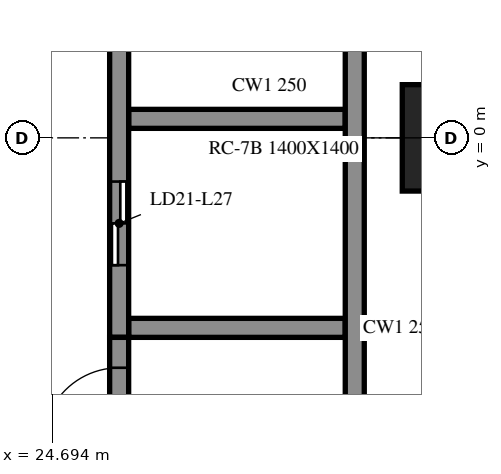
"""IFC4 building model, lengths in metres.
Left out: names, types, materials, properties, quantities, classifications, styles, units other than length and angle.
Written with IfcOpenShell. Run it as: python <this file> out.ifc"""

import sys

from ifc_helpers import new_model, si_unit, direction, frame, frame_2d, origin, origin_2d, place, context, subcontext, project, spatial, rectangle, extrude, element, fill, save


model = new_model("IFC4")
c1 = context("Model", 3, precision=1e-05, world=origin(), true_north=direction((0.0, 1.0)))
c2 = subcontext(c1, "Body", "Model", "MODEL_VIEW")
j1 = project(units=[si_unit("LENGTHUNIT", "METRE"), si_unit("PLANEANGLEUNIT", "RADIAN")], contexts=[c1])
p1 = place(None, origin())
s1 = spatial("IfcSite", under=j1, at=p1, CompositionType="ELEMENT")
p2 = place(p1, origin())
s2 = spatial("IfcBuilding", under=s1, at=p2, CompositionType="ELEMENT")
p3 = place(p2, frame((0.0, 0.0, 117.6)))
s3 = spatial("IfcBuildingStorey", under=s2, at=p3, CompositionType="ELEMENT", Elevation=117.6)
p4 = place(p3, frame((30.0, 0.0, -0.55), z_axis=(0.0, 0.0, 1.0), x_axis=(1.0, 0.0, 0.0)))
e1 = element("IfcColumn", 1, at=p4, inside=s3, PredefinedType="COLUMN", context=c2, shape_type="SweptSolid", body=[
    extrude(rectangle(XDim=1.4, YDim=1.4, at=origin_2d()), origin(), (0.0, 0.0, 1.0), 4.61),
])
p5 = place(p3, frame((28.675, -9.125, 0.0), z_axis=(0.0, 0.0, 1.0), x_axis=(0.0, 1.0, 0.0)))
e2 = element("IfcWall", 2, at=p5, inside=s3, PredefinedType="SOLIDWALL", context=c2, shape_type="SweptSolid", body=[
    extrude(rectangle(XDim=24.25, YDim=0.25, at=frame_2d((12.125, 0.0))), origin(), (0.0, 0.0, 1.0), 4.06),
])
p6 = place(p5, frame((14.425, 0.0, 0.0)))
e3 = element("IfcOpeningElement", 3, at=p6, cuts=e2, PredefinedType="OPENING", context=c2, shape_type="SweptSolid", body=[
    extrude(rectangle(XDim=0.9, YDim=2.1, at=frame_2d((0.45, 1.05))), frame((0.0, 0.135, 0.0), z_axis=(0.0, -1.0, 0.0), x_axis=(1.0, 0.0, 0.0)), (0.0, 0.0, 1.0), 0.27),
])
p7 = place(p5, frame((21.325, 0.0, 0.0)))
e4 = element("IfcOpeningElement", 4, at=p7, cuts=e2, PredefinedType="OPENING", context=c2, shape_type="SweptSolid", body=[
    extrude(rectangle(XDim=0.9, YDim=2.1, at=frame_2d((0.45, 1.05))), frame((0.0, 0.135, 0.0), z_axis=(0.0, -1.0, 0.0), x_axis=(1.0, 0.0, 0.0)), (0.0, 0.0, 1.0), 0.27),
])
p8 = place(p3, frame((25.575, -8.875, 0.0), z_axis=(0.0, 0.0, 1.0), x_axis=(0.0, 1.0, 0.0)))
e5 = element("IfcWall", 5, at=p8, inside=s3, PredefinedType="SOLIDWALL", context=c2, shape_type="SweptSolid", body=[
    extrude(rectangle(XDim=6.25, YDim=0.25, at=frame_2d((3.125, 0.0))), origin(), (0.0, 0.0, 1.0), 4.06),
])
p9 = place(p8, frame((4.85, 0.0, 0.0)))
e6 = element("IfcOpeningElement", 6, at=p9, cuts=e5, PredefinedType="OPENING", context=c2, shape_type="SweptSolid", body=[
    extrude(rectangle(XDim=1.0, YDim=2.1, at=frame_2d((0.5, 1.05))), frame((0.0, 0.135, 0.0), z_axis=(0.0, -1.0, 0.0), x_axis=(1.0, 0.0, 0.0)), (0.0, 0.0, 1.0), 0.27),
])
p10 = place(p3, frame((25.575, 14.875, 0.0), z_axis=(0.0, 0.0, 1.0), x_axis=(0.0, -1.0, 0.0)))
e7 = element("IfcWall", 7, at=p10, inside=s3, PredefinedType="SOLIDWALL", context=c2, shape_type="SweptSolid", body=[
    extrude(rectangle(XDim=17.5, YDim=0.25, at=frame_2d((8.75, 0.0))), origin(), (0.0, 0.0, 1.0), 4.06),
])
p11 = place(p10, frame((15.45, 0.0, 0.0)))
e8 = element("IfcOpeningElement", 8, at=p11, cuts=e7, PredefinedType="OPENING", context=c2, shape_type="SweptSolid", body=[
    extrude(rectangle(XDim=1.1, YDim=2.1, at=frame_2d((0.55, 1.05))), frame((0.0, 0.135, 0.0), z_axis=(0.0, -1.0, 0.0), x_axis=(1.0, 0.0, 0.0)), (0.0, 0.0, 1.0), 0.27),
])
p12 = place(p10, frame((12.8, 0.0, 0.0)))
e9 = element("IfcOpeningElement", 9, at=p12, cuts=e7, PredefinedType="OPENING", context=c2, shape_type="SweptSolid", body=[
    extrude(rectangle(XDim=0.9, YDim=2.1, at=frame_2d((0.45, 1.05))), frame((0.0, 0.135, 0.0), z_axis=(0.0, -1.0, 0.0), x_axis=(1.0, 0.0, 0.0)), (0.0, 0.0, 1.0), 0.27),
])
for number, where, z_axis, x_axis in (
    (10, (25.7, -2.5, 0.0), (0.0, 0.0, 1.0), (1.0, 0.0, 0.0)),
    (11, (25.7, 0.25, 0.0), (0.0, 0.0, 1.0), (1.0, 0.0, 0.0)),
):
    element("IfcWall", number, at=place(p3, frame(where, z_axis=z_axis, x_axis=x_axis)), inside=s3, PredefinedType="SOLIDWALL", context=c2, shape_type="SweptSolid", body=[
        extrude(rectangle(XDim=2.85, YDim=0.25, at=frame_2d((1.425, 0.0))), origin(), (0.0, 0.0, 1.0), 4.06),
    ])
p13 = place(p11, origin())
e12 = element("IfcDoor", 12, at=p13, inside=s3, OperationType="DOUBLE_DOOR_SLIDING", PredefinedType="DOOR", context=c2, shape_type="SweptSolid", body=[
    extrude(rectangle(XDim=1.1, YDim=2.1, at=frame_2d((0.55, 1.05))), frame((0.0, 0.025, 0.0), z_axis=(0.0, -1.0, 0.0), x_axis=(1.0, 0.0, 0.0)), (0.0, 0.0, 1.0), 0.05),
])
fill(e8, e12)
p14 = place(p9, origin())
e13 = element("IfcDoor", 13, at=p14, inside=s3, OperationType="SINGLE_SWING_LEFT", PredefinedType="DOOR", context=c2, shape_type="SweptSolid", body=[
    extrude(rectangle(XDim=1.0, YDim=2.1, at=frame_2d((0.5, 1.05))), frame((0.0, 0.025, 0.0), z_axis=(0.0, -1.0, 0.0), x_axis=(1.0, 0.0, 0.0)), (0.0, 0.0, 1.0), 0.05),
])
fill(e6, e13)
save(model, sys.argv[1])
